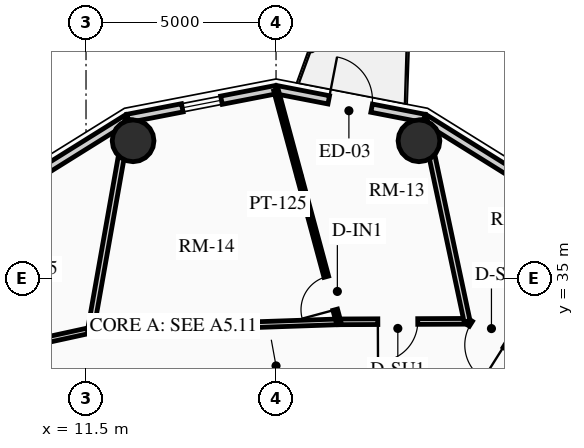
"""IFC4 building model, lengths in metres.
Left out: names, types, materials, properties, quantities, classifications, styles, units other than length and angle.
Written with IfcOpenShell. Run it as: python <this file> out.ifc"""

import sys

from ifc_helpers import new_model, si_unit, direction, frame, frame_2d, origin, origin_2d, place, context, subcontext, project, spatial, rectangle, circle, extrude, source, transform, mapped, element, fill, save


model = new_model("IFC4")
c1 = context("Model", 3, precision=1e-05, world=origin(), true_north=direction((0.0, 1.0)))
c2 = subcontext(c1, "Body", "Model", "MODEL_VIEW")
j1 = project(units=[si_unit("LENGTHUNIT", "METRE"), si_unit("PLANEANGLEUNIT", "RADIAN")], contexts=[c1])
p1 = place(None, origin())
s1 = spatial("IfcSite", under=j1, at=p1, CompositionType="ELEMENT")
p2 = place(p1, origin())
s2 = spatial("IfcBuilding", under=s1, at=p2, CompositionType="ELEMENT")
p3 = place(p2, frame((0.0, 0.0, 208.3)))
s3 = spatial("IfcBuildingStorey", under=s2, at=p3, CompositionType="ELEMENT", Elevation=208.3)
for number, where, z_axis, x_axis in (
    (1, (20.261, 38.623, 0.0), (0.0, 0.0, 1.0), (1.0, 0.0, 0.0)),
    (2, (12.739, 38.623, 0.0), (0.0, 0.0, 1.0), (1.0, 0.0, 0.0)),
):
    element("IfcColumn", number, at=place(p3, frame(where, z_axis=z_axis, x_axis=x_axis)), inside=s3, PredefinedType="USERDEFINED", context=c2, shape_type="SweptSolid", body=[
        extrude(circle(Radius=0.55, at=origin_2d()), origin(), (0.0, 0.0, 1.0), 2.91),
    ])
p4 = place(p3, frame((20.403, 39.213, 0.0), z_axis=(0.0, 0.0, 1.0), x_axis=(0.848318713376, -0.529485939886, 0.0)))
e3 = element("IfcWall", 3, at=p4, inside=s3, PredefinedType="SOLIDWALL", context=c2, shape_type="SweptSolid", body=[
    extrude(rectangle(XDim=4.15, YDim=0.22, at=frame_2d((2.075, 0.0))), origin(), (0.0, 0.0, 1.0), 2.322),
])
p5 = place(p3, frame((16.5, 39.97, 0.0), z_axis=(0.0, 0.0, 1.0), x_axis=(0.981700307484, -0.190432419211, 0.0)))
e4 = element("IfcWall", 4, at=p5, inside=s3, PredefinedType="SOLIDWALL", context=c2, shape_type="SweptSolid", body=[
    extrude(rectangle(XDim=3.976, YDim=0.22, at=frame_2d((1.988, 0.0))), origin(), (0.0, 0.0, 1.0), 2.322),
])
m1 = source(origin(), c2, "Body", "SweptSolid", [
    extrude(rectangle(XDim=1.15, YDim=2.005, at=frame_2d((0.575, 1.002))), frame((0.0, 0.12, 0.0), z_axis=(0.0, -1.0, 0.0), x_axis=(1.0, 0.0, 0.0)), (0.0, 0.0, 1.0), 0.24),
])
p6 = place(p5, frame((1.413, 0.0, 0.0)))
e5 = element("IfcOpeningElement", 5, at=p6, cuts=e4, PredefinedType="OPENING", context=c2, shape_type="MappedRepresentation", body=[
    mapped(m1, transform((0.0, 0.0, 0.0), x_axis=(1.0, 0.0, 0.0), y_axis=(0.0, 1.0, 0.0), z_axis=(0.0, 0.0, 1.0), scale=1.0)),
])
p7 = place(p3, frame((12.597, 39.213, 0.0), z_axis=(0.0, 0.0, 1.0), x_axis=(0.981700307484, 0.190432419211, 0.0)))
e6 = element("IfcWall", 6, at=p7, inside=s3, PredefinedType="SOLIDWALL", context=c2, shape_type="SweptSolid", body=[
    extrude(rectangle(XDim=3.976, YDim=0.22, at=frame_2d((1.988, 0.0))), origin(), (0.0, 0.0, 1.0), 2.322),
])
m2 = source(origin(), c2, "Body", "SweptSolid", [
    extrude(rectangle(XDim=1.05, YDim=1.3, at=frame_2d((0.525, 0.65))), frame((0.0, 0.12, 0.0), z_axis=(0.0, -1.0, 0.0), x_axis=(1.0, 0.0, 0.0)), (0.0, 0.0, 1.0), 0.24),
])
p8 = place(p7, frame((1.463, 0.0, 0.65)))
e7 = element("IfcOpeningElement", 7, at=p8, cuts=e6, PredefinedType="OPENING", context=c2, shape_type="MappedRepresentation", body=[
    mapped(m2, transform((0.0, 0.0, 0.0), x_axis=(1.0, 0.0, 0.0), y_axis=(0.0, 1.0, 0.0), z_axis=(0.0, 0.0, 1.0), scale=1.0)),
])
p9 = place(p3, frame((9.076, 37.015, 0.0), z_axis=(0.0, 0.0, 1.0), x_axis=(0.848318713376, 0.529485939886, 0.0)))
e8 = element("IfcWall", 8, at=p9, inside=s3, PredefinedType="SOLIDWALL", context=c2, shape_type="SweptSolid", body=[
    extrude(rectangle(XDim=4.15, YDim=0.22, at=frame_2d((2.075, 0.0))), origin(), (0.0, 0.0, 1.0), 2.322),
])
p10 = place(p3, frame((22.877, 33.022, 0.0), z_axis=(0.0, 0.0, 1.0), x_axis=(-0.845895608855, 0.533348496689, 0.0)))
e9 = element("IfcWall", 9, at=p10, inside=s3, PredefinedType="PARTITIONING", context=c2, shape_type="SweptSolid", body=[
    extrude(rectangle(XDim=1.597, YDim=0.15, at=frame_2d((0.798, 0.0))), origin(), (0.0, 0.0, 1.0), 2.255),
])
m3 = source(origin(), c2, "Body", "SweptSolid", [
    extrude(rectangle(XDim=1.05, YDim=2.015, at=frame_2d((0.525, 1.007))), frame((0.0, 0.085, 0.0), z_axis=(0.0, -1.0, 0.0), x_axis=(1.0, 0.0, 0.0)), (0.0, 0.0, 1.0), 0.17),
])
p11 = place(p10, frame((0.427, 0.0, 0.0)))
e10 = element("IfcOpeningElement", 10, at=p11, cuts=e9, PredefinedType="OPENING", context=c2, shape_type="MappedRepresentation", body=[
    mapped(m3, transform((0.0, 0.0, 0.0), x_axis=(1.0, 0.0, 0.0), y_axis=(0.0, 1.0, 0.0), z_axis=(0.0, 0.0, 1.0), scale=1.0)),
])
p12 = place(p3, frame((21.527, 33.873, 0.0), z_axis=(0.0, 0.0, 1.0), x_axis=(-0.999991838845, -0.004040079574, 0.0)))
e11 = element("IfcWall", 11, at=p12, inside=s3, PredefinedType="PARTITIONING", context=c2, shape_type="SweptSolid", body=[
    extrude(rectangle(XDim=3.384, YDim=0.15, at=frame_2d((1.692, 0.0))), origin(), (0.0, 0.0, 1.0), 2.322),
])
p13 = place(p12, frame((1.298, 0.0, 0.0)))
e12 = element("IfcOpeningElement", 12, at=p13, cuts=e11, PredefinedType="OPENING", context=c2, shape_type="MappedRepresentation", body=[
    mapped(m3, transform((0.0, 0.0, 0.0), x_axis=(1.0, 0.0, 0.0), y_axis=(0.0, 1.0, 0.0), z_axis=(0.0, 0.0, 1.0), scale=1.0)),
])
p14 = place(p3, frame((18.143, 33.86, 0.0), z_axis=(0.0, 0.0, 1.0), x_axis=(-0.999419208319, -0.034077060363, 0.0)))
e13 = element("IfcWall", 13, at=p14, inside=s3, PredefinedType="PARTITIONING", context=c2, shape_type="SweptSolid", body=[
    extrude(rectangle(XDim=6.527, YDim=0.15, at=frame_2d((3.263, 0.0))), origin(), (0.0, 0.0, 1.0), 2.255),
])
p15 = place(p3, frame((11.62, 33.637, 0.0), z_axis=(0.0, 0.0, 1.0), x_axis=(-0.97702579435, -0.213121085711, 0.0)))
e14 = element("IfcWall", 14, at=p15, inside=s3, PredefinedType="PARTITIONING", context=c2, shape_type="SweptSolid", body=[
    extrude(rectangle(XDim=1.935, YDim=0.15, at=frame_2d((0.967, 0.0))), origin(), (0.0, 0.0, 1.0), 2.255),
])
p16 = place(p3, frame((21.527, 33.873, 0.0), z_axis=(0.0, 0.0, 1.0), x_axis=(-0.207772326864, 0.97817721308, 0.0)))
e15 = element("IfcWall", 15, at=p16, inside=s3, PredefinedType="PARTITIONING", context=c2, shape_type="SweptSolid", body=[
    extrude(rectangle(XDim=5.439, YDim=0.16, at=frame_2d((2.72, 0.0))), origin(), (0.0, 0.0, 1.0), 2.322),
])
p17 = place(p3, frame((11.62, 33.637, 0.0), z_axis=(0.0, 0.0, 1.0), x_axis=(0.174269061361, 0.984698072636, 0.0)))
e16 = element("IfcWall", 16, at=p17, inside=s3, PredefinedType="PARTITIONING", context=c2, shape_type="SweptSolid", body=[
    extrude(rectangle(XDim=5.643, YDim=0.16, at=frame_2d((2.822, 0.0))), origin(), (0.0, 0.0, 1.0), 2.322),
])
p18 = place(p3, frame((18.143, 33.86, 0.0), z_axis=(0.0, 0.0, 1.0), x_axis=(-0.260434252895, 0.965491584592, 0.0)))
e17 = element("IfcWall", 17, at=p18, inside=s3, PredefinedType="PARTITIONING", context=c2, shape_type="SweptSolid", body=[
    extrude(rectangle(XDim=6.308, YDim=0.125, at=frame_2d((3.154, 0.0))), origin(), (0.0, 0.0, 1.0), 2.322),
])
m4 = source(origin(), c2, "Body", "SweptSolid", [
    extrude(rectangle(XDim=0.9, YDim=2.005, at=frame_2d((0.45, 1.002))), frame((0.0, 0.073, 0.0), z_axis=(0.0, -1.0, 0.0), x_axis=(1.0, 0.0, 0.0)), (0.0, 0.0, 1.0), 0.145),
])
p19 = place(p18, frame((0.33, 0.0, 0.0)))
e18 = element("IfcOpeningElement", 18, at=p19, cuts=e17, PredefinedType="OPENING", context=c2, shape_type="MappedRepresentation", body=[
    mapped(m4, transform((0.0, 0.0, 0.0), x_axis=(1.0, 0.0, 0.0), y_axis=(0.0, 1.0, 0.0), z_axis=(0.0, 0.0, 1.0), scale=1.0)),
])
m5 = source(origin(), c2, "Body", "SweptSolid", [
    extrude(rectangle(XDim=1.15, YDim=2.005, at=frame_2d((0.575, 1.002))), frame((0.0, 0.025, 0.0), z_axis=(0.0, -1.0, 0.0), x_axis=(1.0, 0.0, 0.0)), (0.0, 0.0, 1.0), 0.05),
])
p20 = place(p6, origin())
e19 = element("IfcDoor", 19, at=p20, inside=s3, OperationType="SINGLE_SWING_LEFT", PredefinedType="DOOR", context=c2, shape_type="MappedRepresentation", body=[
    mapped(m5, transform((0.0, 0.0, 0.0), x_axis=(1.0, 0.0, 0.0), y_axis=(0.0, 1.0, 0.0), z_axis=(0.0, 0.0, 1.0), scale=1.0)),
])
fill(e5, e19)
m6 = source(origin(), c2, "Body", "SweptSolid", [
    extrude(rectangle(XDim=1.05, YDim=1.3, at=frame_2d((0.525, 0.65))), frame((0.0, 0.03, 0.0), z_axis=(0.0, -1.0, 0.0), x_axis=(1.0, 0.0, 0.0)), (0.0, 0.0, 1.0), 0.06),
])
p21 = place(p8, origin())
e20 = element("IfcWindow", 20, at=p21, inside=s3, PartitioningType="SINGLE_PANEL", PredefinedType="WINDOW", context=c2, shape_type="MappedRepresentation", body=[
    mapped(m6, transform((0.0, 0.0, 0.0), x_axis=(1.0, 0.0, 0.0), y_axis=(0.0, 1.0, 0.0), z_axis=(0.0, 0.0, 1.0), scale=1.0)),
])
fill(e7, e20)
m7 = source(origin(), c2, "Body", "SweptSolid", [
    extrude(rectangle(XDim=1.05, YDim=2.015, at=frame_2d((0.525, 1.007))), frame((0.0, 0.025, 0.0), z_axis=(0.0, -1.0, 0.0), x_axis=(1.0, 0.0, 0.0)), (0.0, 0.0, 1.0), 0.05),
])
p22 = place(p11, origin())
e21 = element("IfcDoor", 21, at=p22, inside=s3, OperationType="SINGLE_SWING_LEFT", PredefinedType="DOOR", context=c2, shape_type="MappedRepresentation", body=[
    mapped(m7, transform((0.0, 0.0, 0.0), x_axis=(1.0, 0.0, 0.0), y_axis=(0.0, 1.0, 0.0), z_axis=(0.0, 0.0, 1.0), scale=1.0)),
])
fill(e10, e21)
p23 = place(p13, origin())
e22 = element("IfcDoor", 22, at=p23, inside=s3, OperationType="SINGLE_SWING_RIGHT", PredefinedType="DOOR", context=c2, shape_type="MappedRepresentation", body=[
    mapped(m7, transform((0.0, 0.0, 0.0), x_axis=(1.0, 0.0, 0.0), y_axis=(0.0, 1.0, 0.0), z_axis=(0.0, 0.0, 1.0), scale=1.0)),
])
fill(e12, e22)
m8 = source(origin(), c2, "Body", "SweptSolid", [
    extrude(rectangle(XDim=0.9, YDim=2.005, at=frame_2d((0.45, 1.002))), frame((0.0, 0.025, 0.0), z_axis=(0.0, -1.0, 0.0), x_axis=(1.0, 0.0, 0.0)), (0.0, 0.0, 1.0), 0.05),
])
p24 = place(p19, origin())
e23 = element("IfcDoor", 23, at=p24, inside=s3, OperationType="SINGLE_SWING_LEFT", PredefinedType="DOOR", context=c2, shape_type="MappedRepresentation", body=[
    mapped(m8, transform((0.0, 0.0, 0.0), x_axis=(1.0, 0.0, 0.0), y_axis=(0.0, 1.0, 0.0), z_axis=(0.0, 0.0, 1.0), scale=1.0)),
])
fill(e18, e23)
save(model, sys.argv[1])
